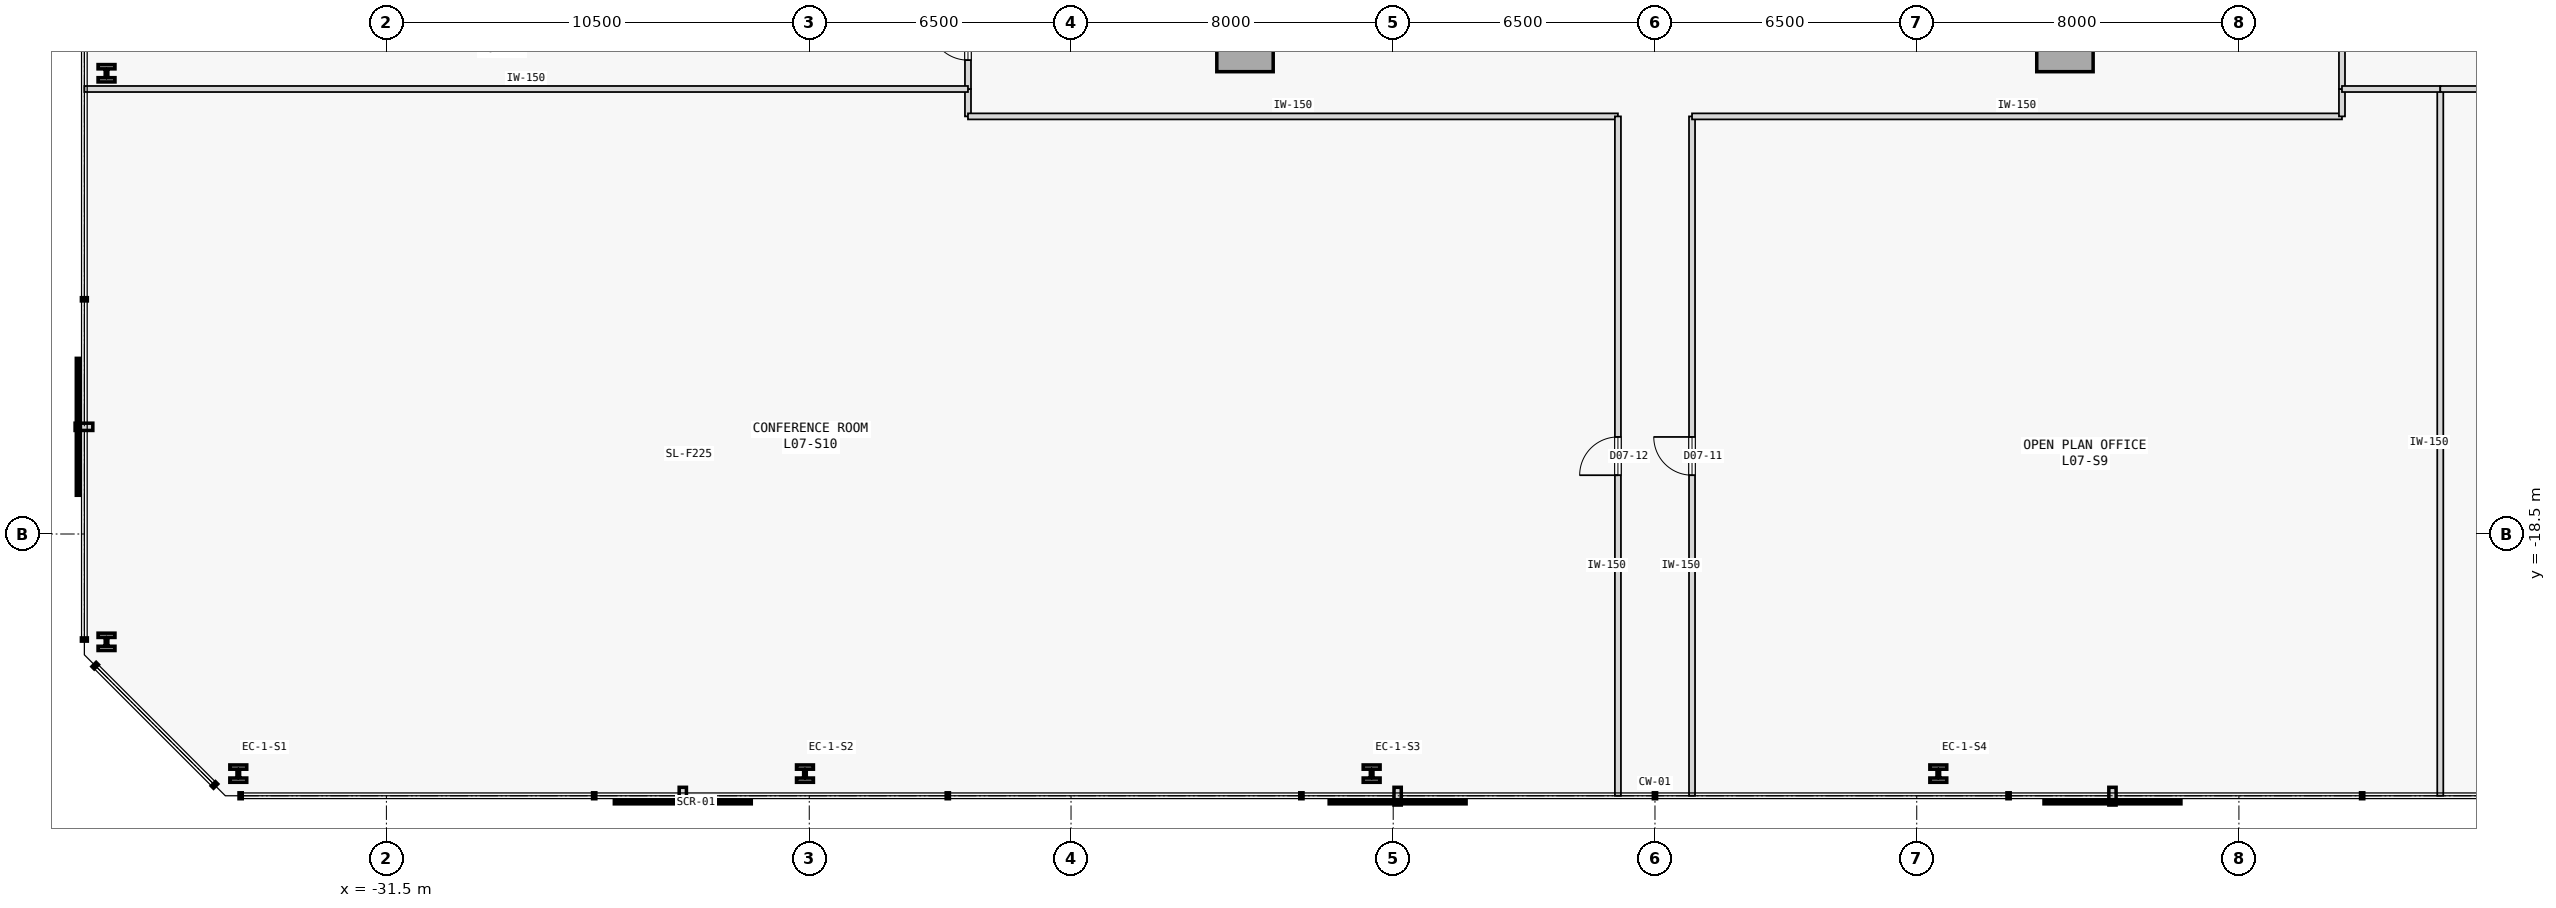
"""IFC4 building model, lengths in metres.
Left out: names, types, materials, properties, quantities, classifications, styles, units other than length and angle.
Written with IfcOpenShell. Run it as: python <this file> out.ifc"""

import sys

from ifc_helpers import new_model, si_unit, direction, frame, frame_2d, origin, origin_2d, place, context, subcontext, project, spatial, rectangle, i_section, extrude, element, fill, save


model = new_model("IFC4")
c1 = context("Model", 3, precision=1e-05, world=origin(), true_north=direction((0.0, 1.0)))
c2 = subcontext(c1, "Body", "Model", "MODEL_VIEW")
j1 = project(units=[si_unit("LENGTHUNIT", "METRE"), si_unit("PLANEANGLEUNIT", "RADIAN")], contexts=[c1])
p1 = place(None, origin())
s1 = spatial("IfcSite", under=j1, at=p1, CompositionType="ELEMENT")
p2 = place(p1, origin())
s2 = spatial("IfcBuilding", under=s1, at=p2, CompositionType="ELEMENT")
p3 = place(p2, frame((0.0, 0.0, 33.2)))
s3 = spatial("IfcBuildingStorey", under=s2, at=p3, CompositionType="ELEMENT", Elevation=33.2)
for number, where, z_axis, x_axis in (
    (1, (-10.18, -6.32, 0.0), (0.0, 0.0, 1.0), (1.0, 0.0, 0.0)),
    (2, (10.18, -6.32, 0.0), (0.0, 0.0, 1.0), (1.0, 0.0, 0.0)),
):
    element("IfcColumn", number, at=place(p3, frame(where, z_axis=z_axis, x_axis=x_axis)), inside=s3, PredefinedType="COLUMN", context=c2, shape_type="SweptSolid", body=[
        extrude(rectangle(XDim=1.4, YDim=1.4, at=origin_2d()), origin(), (0.0, 0.0, 1.0), 3.8),
    ])
for number, where, z_axis, x_axis in (
    (3, (-35.178, -24.45, 0.0), (0.0, 0.0, 1.0), (1.0, 0.0, 0.0)),
    (4, (-21.107, -24.45, 0.0), (0.0, 0.0, 1.0), (1.0, 0.0, 0.0)),
    (5, (-7.036, -24.45, 0.0), (0.0, 0.0, 1.0), (1.0, 0.0, 0.0)),
    (6, (7.036, -24.45, 0.0), (0.0, 0.0, 1.0), (1.0, 0.0, 0.0)),
    (7, (-38.45, -7.059, 0.0), (0.0, 0.0, 1.0), (1.0, 0.0, 0.0)),
    (8, (-38.45, -21.178, 0.0), (0.0, 0.0, 1.0), (1.0, 0.0, 0.0)),
):
    element("IfcColumn", number, at=place(p3, frame(where, z_axis=z_axis, x_axis=x_axis)), inside=s3, PredefinedType="COLUMN", context=c2, shape_type="SweptSolid", body=[
        extrude(i_section(OverallWidth=0.42, OverallDepth=0.431, WebThickness=0.065, FlangeThickness=0.106, FilletRadius=0.015, at=origin_2d()), origin(), (0.0, 0.0, 1.0), 3.8),
    ])
p4 = place(p3, frame((0.92, -25.0, 0.0), z_axis=(0.0, 0.0, 1.0), x_axis=(0.0, 1.0, 0.0)))
e9 = element("IfcWall", 9, at=p4, inside=s3, PredefinedType="PARTITIONING", context=c2, shape_type="SweptSolid", body=[
    extrude(rectangle(XDim=16.87, YDim=0.15, at=frame_2d((8.435, 0.0))), origin(), (0.0, 0.0, 1.0), 3.575),
])
p5 = place(p4, frame((7.96, 0.0, 0.0)))
e10 = element("IfcOpeningElement", 10, at=p5, cuts=e9, PredefinedType="OPENING", context=c2, shape_type="SweptSolid", body=[
    extrude(rectangle(XDim=0.95, YDim=2.15, at=frame_2d((0.475, 1.075))), frame((0.0, 0.085, 0.0), z_axis=(0.0, -1.0, 0.0), x_axis=(1.0, 0.0, 0.0)), (0.0, 0.0, 1.0), 0.17),
])
p6 = place(p3, frame((0.92, -8.13, 0.0), z_axis=(0.0, 0.0, 1.0), x_axis=(1.0, 0.0, 0.0)))
e11 = element("IfcWall", 11, at=p6, inside=s3, PredefinedType="PARTITIONING", context=c2, shape_type="SweptSolid", body=[
    extrude(rectangle(XDim=16.139, YDim=0.15, at=frame_2d((8.07, 0.0))), origin(), (0.0, 0.0, 1.0), 3.575),
])
for number, where, z_axis, x_axis in (
    (12, (17.059, -8.13, 0.0), (0.0, 0.0, 1.0), (0.0, 1.0, 0.0)),
    (13, (-17.059, -8.13, 0.0), (0.0, 0.0, 1.0), (0.0, 1.0, 0.0)),
):
    element("IfcWall", number, at=place(p3, frame(where, z_axis=z_axis, x_axis=x_axis)), inside=s3, PredefinedType="PARTITIONING", context=c2, shape_type="SweptSolid", body=[
        extrude(rectangle(XDim=0.68, YDim=0.15, at=frame_2d((0.34, 0.0))), origin(), (0.0, 0.0, 1.0), 3.575),
    ])
p7 = place(p3, frame((-17.059, -8.13, 0.0), z_axis=(0.0, 0.0, 1.0), x_axis=(1.0, 0.0, 0.0)))
e14 = element("IfcWall", 14, at=p7, inside=s3, PredefinedType="PARTITIONING", context=c2, shape_type="SweptSolid", body=[
    extrude(rectangle(XDim=16.139, YDim=0.15, at=frame_2d((8.07, 0.0))), origin(), (0.0, 0.0, 1.0), 3.575),
])
p8 = place(p3, frame((-0.92, -25.0, 0.0), z_axis=(0.0, 0.0, 1.0), x_axis=(0.0, 1.0, 0.0)))
e15 = element("IfcWall", 15, at=p8, inside=s3, PredefinedType="PARTITIONING", context=c2, shape_type="SweptSolid", body=[
    extrude(rectangle(XDim=16.87, YDim=0.15, at=frame_2d((8.435, 0.0))), origin(), (0.0, 0.0, 1.0), 3.575),
])
p9 = place(p8, frame((7.96, 0.0, 0.0)))
e16 = element("IfcOpeningElement", 16, at=p9, cuts=e15, PredefinedType="OPENING", context=c2, shape_type="SweptSolid", body=[
    extrude(rectangle(XDim=0.95, YDim=2.15, at=frame_2d((0.475, 1.075))), frame((0.0, 0.085, 0.0), z_axis=(0.0, -1.0, 0.0), x_axis=(1.0, 0.0, 0.0)), (0.0, 0.0, 1.0), 0.17),
])
p10 = place(p3, frame((-17.059, -7.45, 0.0), z_axis=(0.0, 0.0, 1.0), x_axis=(0.0, 1.0, 0.0)))
e17 = element("IfcWall", 17, at=p10, inside=s3, PredefinedType="PARTITIONING", context=c2, shape_type="SweptSolid", body=[
    extrude(rectangle(XDim=2.384, YDim=0.15, at=frame_2d((1.192, 0.0))), origin(), (0.0, 0.0, 1.0), 3.575),
])
p11 = place(p10, frame((0.717, 0.0, 0.0)))
e18 = element("IfcOpeningElement", 18, at=p11, cuts=e17, PredefinedType="OPENING", context=c2, shape_type="SweptSolid", body=[
    extrude(rectangle(XDim=0.95, YDim=2.15, at=frame_2d((0.475, 1.075))), frame((0.0, 0.085, 0.0), z_axis=(0.0, -1.0, 0.0), x_axis=(1.0, 0.0, 0.0)), (0.0, 0.0, 1.0), 0.17),
])
p12 = place(p3, frame((17.059, -7.45, 0.0), z_axis=(0.0, 0.0, 1.0), x_axis=(0.0, 1.0, 0.0)))
e19 = element("IfcWall", 19, at=p12, inside=s3, PredefinedType="PARTITIONING", context=c2, shape_type="SweptSolid", body=[
    extrude(rectangle(XDim=6.53, YDim=0.15, at=frame_2d((3.265, 0.0))), origin(), (0.0, 0.0, 1.0), 3.575),
])
p13 = place(p3, frame((19.5, -25.0, 0.0), z_axis=(0.0, 0.0, 1.0), x_axis=(0.0, 1.0, 0.0)))
e20 = element("IfcWall", 20, at=p13, inside=s3, PredefinedType="PARTITIONING", context=c2, shape_type="SweptSolid", body=[
    extrude(rectangle(XDim=17.55, YDim=0.15, at=frame_2d((8.775, 0.0))), origin(), (0.0, 0.0, 1.0), 3.575),
])
p14 = place(p3, frame((17.059, -7.45, 0.0), z_axis=(0.0, 0.0, 1.0), x_axis=(1.0, 0.0, 0.0)))
e21 = element("IfcWall", 21, at=p14, inside=s3, PredefinedType="PARTITIONING", context=c2, shape_type="SweptSolid", body=[
    extrude(rectangle(XDim=2.441, YDim=0.15, at=frame_2d((1.22, 0.0))), origin(), (0.0, 0.0, 1.0), 3.575),
])
p15 = place(p3, frame((-39.0, -7.45, 0.0), z_axis=(0.0, 0.0, 1.0), x_axis=(1.0, 0.0, 0.0)))
e22 = element("IfcWall", 22, at=p15, inside=s3, PredefinedType="PARTITIONING", context=c2, shape_type="SweptSolid", body=[
    extrude(rectangle(XDim=21.941, YDim=0.15, at=frame_2d((10.97, 0.0))), origin(), (0.0, 0.0, 1.0), 3.575),
])
p16 = place(p3, frame((19.5, -7.45, 0.0), z_axis=(0.0, 0.0, 1.0), x_axis=(1.0, 0.0, 0.0)))
e23 = element("IfcWall", 23, at=p16, inside=s3, PredefinedType="PARTITIONING", context=c2, shape_type="SweptSolid", body=[
    extrude(rectangle(XDim=19.5, YDim=0.15, at=frame_2d((9.75, 0.0))), origin(), (0.0, 0.0, 1.0), 3.575),
])
p17 = place(p16, frame((9.275, 0.0, 0.0)))
e24 = element("IfcOpeningElement", 24, at=p17, cuts=e23, PredefinedType="OPENING", context=c2, shape_type="SweptSolid", body=[
    extrude(rectangle(XDim=0.95, YDim=2.15, at=frame_2d((0.475, 1.075))), frame((0.0, 0.085, 0.0), z_axis=(0.0, -1.0, 0.0), x_axis=(1.0, 0.0, 0.0)), (0.0, 0.0, 1.0), 0.17),
])
p18 = place(p5, origin())
e25 = element("IfcDoor", 25, at=p18, inside=s3, OperationType="SINGLE_SWING_RIGHT", PredefinedType="DOOR", context=c2, shape_type="SweptSolid", body=[
    extrude(rectangle(XDim=0.95, YDim=2.15, at=frame_2d((0.475, 1.075))), frame((0.0, 0.025, 0.0), z_axis=(0.0, -1.0, 0.0), x_axis=(1.0, 0.0, 0.0)), (0.0, 0.0, 1.0), 0.05),
])
fill(e10, e25)
p19 = place(p9, origin())
e26 = element("IfcDoor", 26, at=p19, inside=s3, OperationType="SINGLE_SWING_LEFT", PredefinedType="DOOR", context=c2, shape_type="SweptSolid", body=[
    extrude(rectangle(XDim=0.95, YDim=2.15, at=frame_2d((0.475, 1.075))), frame((0.0, 0.025, 0.0), z_axis=(0.0, -1.0, 0.0), x_axis=(1.0, 0.0, 0.0)), (0.0, 0.0, 1.0), 0.05),
])
fill(e16, e26)
p20 = place(p11, origin())
e27 = element("IfcDoor", 27, at=p20, inside=s3, OperationType="SINGLE_SWING_RIGHT", PredefinedType="DOOR", context=c2, shape_type="SweptSolid", body=[
    extrude(rectangle(XDim=0.95, YDim=2.15, at=frame_2d((0.475, 1.075))), frame((0.0, 0.025, 0.0), z_axis=(0.0, -1.0, 0.0), x_axis=(1.0, 0.0, 0.0)), (0.0, 0.0, 1.0), 0.05),
])
fill(e18, e27)
save(model, sys.argv[1])
